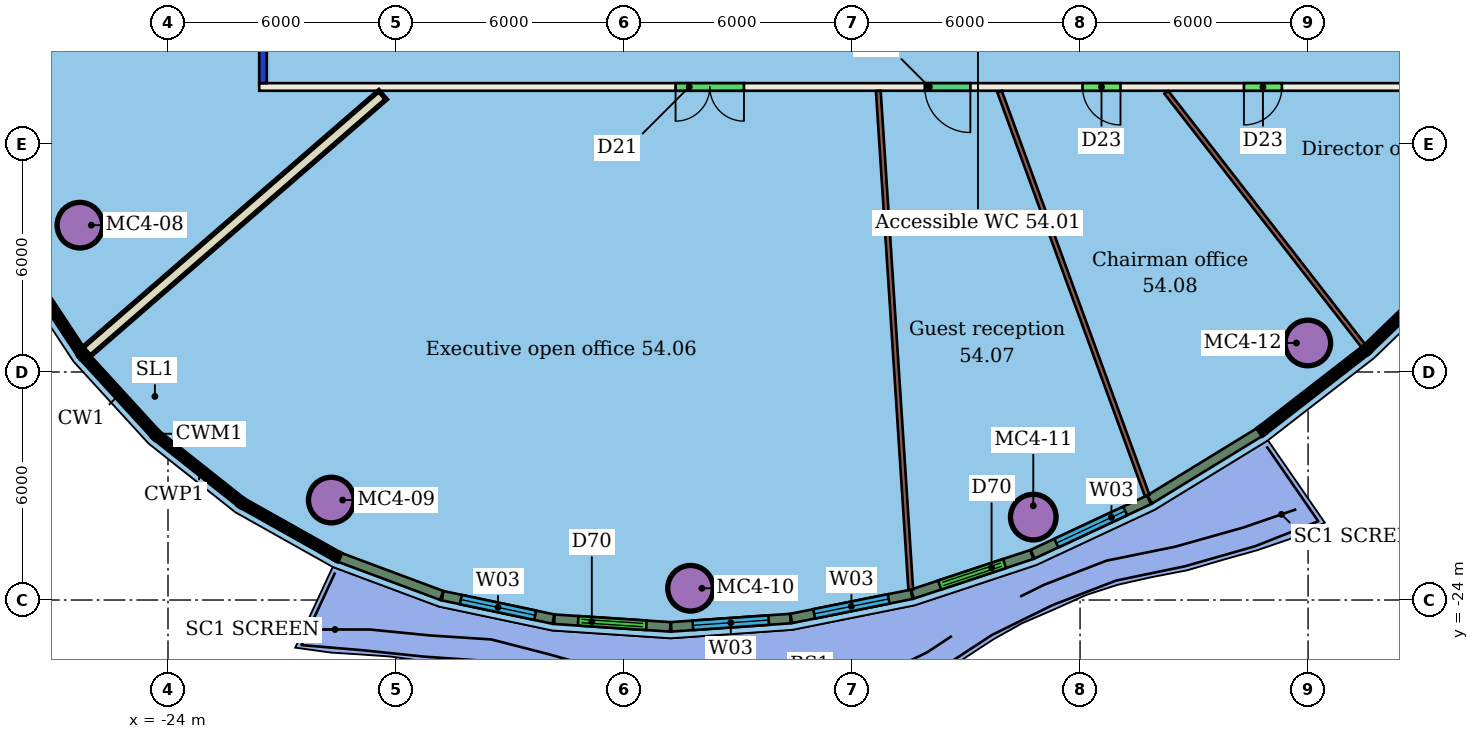
"""IFC4 building model, lengths in metres.
Left out: names, types, materials, properties, quantities, classifications, styles, units other than length and angle.
Written with IfcOpenShell. Run it as: python <this file> out.ifc"""

import sys

from ifc_helpers import new_model, si_unit, direction, frame, frame_2d, origin, origin_2d, place, context, subcontext, project, spatial, rectangle, hollow_circle, extrude, element, fill, save


model = new_model("IFC4")
c1 = context("Model", 3, precision=1e-05, world=origin(), true_north=direction((0.0, 1.0)))
c2 = subcontext(c1, "Body", "Model", "MODEL_VIEW")
j1 = project(units=[si_unit("LENGTHUNIT", "METRE"), si_unit("PLANEANGLEUNIT", "RADIAN")], contexts=[c1])
p1 = place(None, origin())
s1 = spatial("IfcSite", under=j1, at=p1, CompositionType="ELEMENT")
p2 = place(p1, origin())
s2 = spatial("IfcBuilding", under=s1, at=p2, CompositionType="ELEMENT")
p3 = place(p2, frame((0.0, 0.0, 220.9)))
s3 = spatial("IfcBuildingStorey", under=s2, at=p3, CompositionType="ELEMENT", Elevation=220.9)
for number, where, z_axis, x_axis in (
    (1, (-26.318, -14.137, 0.0), (0.0, 0.0, 1.0), (1.0, 0.0, 0.0)),
    (2, (-19.704, -21.37, 0.0), (0.0, 0.0, 1.0), (1.0, 0.0, 0.0)),
    (3, (-10.25, -23.691, 0.0), (0.0, 0.0, 1.0), (1.0, 0.0, 0.0)),
    (4, (-1.231, -21.819, 0.0), (0.0, 0.0, 1.0), (1.0, 0.0, 0.0)),
    (5, (5.993, -17.237, 0.0), (0.0, 0.0, 1.0), (1.0, 0.0, 0.0)),
):
    element("IfcColumn", number, at=place(p3, frame(where, z_axis=z_axis, x_axis=x_axis)), inside=s3, PredefinedType="COLUMN", context=c2, shape_type="SweptSolid", body=[
        extrude(hollow_circle(Radius=0.6, WallThickness=0.045, at=origin_2d()), origin(), (0.0, 0.0, 1.0), 3.45),
    ])
p4 = place(p3, frame((9.6, -10.5, 0.0), z_axis=(0.0, 0.0, 1.0), x_axis=(-1.0, 0.0, 0.0)))
e6 = element("IfcWall", 6, at=p4, inside=s3, PredefinedType="PARTITIONING", context=c2, shape_type="SweptSolid", body=[
    extrude(rectangle(XDim=31.2, YDim=0.2, at=frame_2d((15.6, 0.0))), origin(), (0.0, 0.0, 1.0), 3.45),
])
p5 = place(p4, frame((18.444, 0.0, 0.0)))
e7 = element("IfcOpeningElement", 7, at=p5, cuts=e6, PredefinedType="OPENING", context=c2, shape_type="SweptSolid", body=[
    extrude(rectangle(XDim=1.8, YDim=2.1, at=frame_2d((0.9, 1.05))), frame((0.0, 0.11, 0.0), z_axis=(0.0, -1.0, 0.0), x_axis=(1.0, 0.0, 0.0)), (0.0, 0.0, 1.0), 0.22),
])
p6 = place(p4, frame((12.487, 0.0, 0.0)))
e8 = element("IfcOpeningElement", 8, at=p6, cuts=e6, PredefinedType="OPENING", context=c2, shape_type="SweptSolid", body=[
    extrude(rectangle(XDim=1.2, YDim=2.4, at=frame_2d((0.6, 1.2))), frame((0.0, 0.11, 0.0), z_axis=(0.0, -1.0, 0.0), x_axis=(1.0, 0.0, 0.0)), (0.0, 0.0, 1.0), 0.22),
])
p7 = place(p4, frame((8.536, 0.0, 0.0)))
e9 = element("IfcOpeningElement", 9, at=p7, cuts=e6, PredefinedType="OPENING", context=c2, shape_type="SweptSolid", body=[
    extrude(rectangle(XDim=1.0, YDim=2.4, at=frame_2d((0.5, 1.2))), frame((0.0, 0.11, 0.0), z_axis=(0.0, -1.0, 0.0), x_axis=(1.0, 0.0, 0.0)), (0.0, 0.0, 1.0), 0.22),
])
p8 = place(p4, frame((4.288, 0.0, 0.0)))
e10 = element("IfcOpeningElement", 10, at=p8, cuts=e6, PredefinedType="OPENING", context=c2, shape_type="SweptSolid", body=[
    extrude(rectangle(XDim=1.0, YDim=2.4, at=frame_2d((0.5, 1.2))), frame((0.0, 0.11, 0.0), z_axis=(0.0, -1.0, 0.0), x_axis=(1.0, 0.0, 0.0)), (0.0, 0.0, 1.0), 0.22),
])
p9 = place(p3, frame((-21.5, -10.4, 0.0), z_axis=(0.0, 0.0, 1.0), x_axis=(0.0, 1.0, 0.0)))
e11 = element("IfcWall", 11, at=p9, inside=s3, PredefinedType="PARTITIONING", context=c2, shape_type="SweptSolid", body=[
    extrude(rectangle(XDim=20.8, YDim=0.2, at=frame_2d((10.4, 0.0))), origin(), (0.0, 0.0, 1.0), 3.05),
])
p10 = place(p9, frame((13.413, 0.0, 0.0)))
e12 = element("IfcOpeningElement", 12, at=p10, cuts=e11, PredefinedType="OPENING", context=c2, shape_type="SweptSolid", body=[
    extrude(rectangle(XDim=1.0, YDim=2.4, at=frame_2d((0.5, 1.2))), frame((0.0, 0.11, 0.0), z_axis=(0.0, -1.0, 0.0), x_axis=(1.0, 0.0, 0.0)), (0.0, 0.0, 1.0), 0.22),
])
p11 = place(p9, frame((5.693, 0.0, 0.0)))
e13 = element("IfcOpeningElement", 13, at=p11, cuts=e11, PredefinedType="OPENING", context=c2, shape_type="SweptSolid", body=[
    extrude(rectangle(XDim=1.8, YDim=2.4, at=frame_2d((0.9, 1.2))), frame((0.0, 0.11, 0.0), z_axis=(0.0, -1.0, 0.0), x_axis=(1.0, 0.0, 0.0)), (0.0, 0.0, 1.0), 0.22),
])
p12 = place(p3, frame((-26.146, -17.469, 0.0), z_axis=(0.0, 0.0, 1.0), x_axis=(0.755515634714, 0.655130617284, 0.0)))
e14 = element("IfcWall", 14, at=p12, inside=s3, PredefinedType="PARTITIONING", context=c2, shape_type="SweptSolid", body=[
    extrude(rectangle(XDim=10.312, YDim=0.3, at=frame_2d((5.156, 0.0))), origin(), (0.0, 0.0, 1.0), 3.45),
])
p13 = place(p3, frame((-4.455, -23.727, 0.0), z_axis=(0.0, 0.0, 1.0), x_axis=(-0.064995948595, 0.997885527837, 0.0)))
e15 = element("IfcWall", 15, at=p13, inside=s3, PredefinedType="PARTITIONING", context=c2, shape_type="SweptSolid", body=[
    extrude(rectangle(XDim=13.151, YDim=0.125, at=frame_2d((6.575, 0.0))), origin(), (0.0, 0.0, 1.0), 3.45),
])
p14 = place(p3, frame((1.765, -21.249, 0.0), z_axis=(0.0, 0.0, 1.0), x_axis=(-0.343220407619, 0.939254891813, 0.0)))
e16 = element("IfcWall", 16, at=p14, inside=s3, PredefinedType="PARTITIONING", context=c2, shape_type="SweptSolid", body=[
    extrude(rectangle(XDim=11.315, YDim=0.125, at=frame_2d((5.657, 0.0))), origin(), (0.0, 0.0, 1.0), 3.45),
])
p15 = place(p3, frame((7.457, -17.314, 0.0), z_axis=(0.0, 0.0, 1.0), x_axis=(-0.613674696521, 0.789558969837, 0.0)))
e17 = element("IfcWall", 17, at=p15, inside=s3, PredefinedType="PARTITIONING", context=c2, shape_type="SweptSolid", body=[
    extrude(rectangle(XDim=8.455, YDim=0.125, at=frame_2d((4.228, 0.0))), origin(), (0.0, 0.0, 1.0), 3.45),
])
p16 = place(p3, frame((-19.488, -22.876, 0.0), z_axis=(0.0, 0.0, 1.0), x_axis=(0.936925456517, -0.34952923902, 0.0)))
e18 = element("IfcWall", 18, at=p16, inside=s3, PredefinedType="SOLIDWALL", context=c2, shape_type="SweptSolid", body=[
    extrude(rectangle(XDim=2.871, YDim=0.25, at=frame_2d((1.436, 0.0))), origin(), (0.0, 0.0, 1.0), 3.1),
])
p17 = place(p3, frame((-16.773, -23.887, 0.0), z_axis=(0.0, 0.0, 1.0), x_axis=(0.978444408338, -0.206510386645, 0.0)))
e19 = element("IfcWall", 19, at=p17, inside=s3, PredefinedType="SOLIDWALL", context=c2, shape_type="SweptSolid", body=[
    extrude(rectangle(XDim=2.978, YDim=0.25, at=frame_2d((1.489, 0.0))), origin(), (0.0, 0.0, 1.0), 3.1),
])
p18 = place(p17, frame((0.489, 0.0, 0.9)))
e20 = element("IfcOpeningElement", 20, at=p18, cuts=e19, PredefinedType="OPENING", context=c2, shape_type="SweptSolid", body=[
    extrude(rectangle(XDim=2.0, YDim=2.1, at=frame_2d((1.0, 1.05))), frame((0.0, 0.135, 0.0), z_axis=(0.0, -1.0, 0.0), x_axis=(1.0, 0.0, 0.0)), (0.0, 0.0, 1.0), 0.27),
])
p19 = place(p3, frame((-13.833, -24.506, 0.0), z_axis=(0.0, 0.0, 1.0), x_axis=(0.997842734826, -0.065649650074, 0.0)))
e21 = element("IfcWall", 21, at=p19, inside=s3, PredefinedType="SOLIDWALL", context=c2, shape_type="SweptSolid", body=[
    extrude(rectangle(XDim=3.057, YDim=0.25, at=frame_2d((1.528, 0.0))), origin(), (0.0, 0.0, 1.0), 3.1),
])
p20 = place(p19, frame((0.628, 0.0, 0.0)))
e22 = element("IfcOpeningElement", 22, at=p20, cuts=e21, PredefinedType="OPENING", context=c2, shape_type="SweptSolid", body=[
    extrude(rectangle(XDim=1.8, YDim=2.4, at=frame_2d((0.9, 1.2))), frame((0.0, 0.135, 0.0), z_axis=(0.0, -1.0, 0.0), x_axis=(1.0, 0.0, 0.0)), (0.0, 0.0, 1.0), 0.27),
])
p21 = place(p3, frame((-10.758, -24.706, 0.0), z_axis=(0.0, 0.0, 1.0), x_axis=(0.997585250628, 0.069452629395, 0.0)))
e23 = element("IfcWall", 23, at=p21, inside=s3, PredefinedType="SOLIDWALL", context=c2, shape_type="SweptSolid", body=[
    extrude(rectangle(XDim=3.143, YDim=0.25, at=frame_2d((1.571, 0.0))), origin(), (0.0, 0.0, 1.0), 3.1),
])
p22 = place(p21, frame((0.571, 0.0, 0.9)))
e24 = element("IfcOpeningElement", 24, at=p22, cuts=e23, PredefinedType="OPENING", context=c2, shape_type="SweptSolid", body=[
    extrude(rectangle(XDim=2.0, YDim=2.1, at=frame_2d((1.0, 1.05))), frame((0.0, 0.135, 0.0), z_axis=(0.0, -1.0, 0.0), x_axis=(1.0, 0.0, 0.0)), (0.0, 0.0, 1.0), 0.27),
])
p23 = place(p3, frame((-7.6, -24.485, 0.0), z_axis=(0.0, 0.0, 1.0), x_axis=(0.980484586875, 0.19659596868, 0.0)))
e25 = element("IfcWall", 25, at=p23, inside=s3, PredefinedType="SOLIDWALL", context=c2, shape_type="SweptSolid", body=[
    extrude(rectangle(XDim=3.229, YDim=0.25, at=frame_2d((1.614, 0.0))), origin(), (0.0, 0.0, 1.0), 3.1),
])
p24 = place(p23, frame((0.614, 0.0, 0.9)))
e26 = element("IfcOpeningElement", 26, at=p24, cuts=e25, PredefinedType="OPENING", context=c2, shape_type="SweptSolid", body=[
    extrude(rectangle(XDim=2.0, YDim=2.1, at=frame_2d((1.0, 1.05))), frame((0.0, 0.135, 0.0), z_axis=(0.0, -1.0, 0.0), x_axis=(1.0, 0.0, 0.0)), (0.0, 0.0, 1.0), 0.27),
])
p25 = place(p3, frame((-4.411, -23.844, 0.0), z_axis=(0.0, 0.0, 1.0), x_axis=(0.949220414117, 0.314611832935, 0.0)))
e27 = element("IfcWall", 27, at=p25, inside=s3, PredefinedType="SOLIDWALL", context=c2, shape_type="SweptSolid", body=[
    extrude(rectangle(XDim=3.31, YDim=0.25, at=frame_2d((1.655, 0.0))), origin(), (0.0, 0.0, 1.0), 3.1),
])
p26 = place(p25, frame((0.755, 0.0, 0.0)))
e28 = element("IfcOpeningElement", 28, at=p26, cuts=e27, PredefinedType="OPENING", context=c2, shape_type="SweptSolid", body=[
    extrude(rectangle(XDim=1.8, YDim=2.4, at=frame_2d((0.9, 1.2))), frame((0.0, 0.135, 0.0), z_axis=(0.0, -1.0, 0.0), x_axis=(1.0, 0.0, 0.0)), (0.0, 0.0, 1.0), 0.27),
])
p27 = place(p3, frame((-1.249, -22.794, 0.0), z_axis=(0.0, 0.0, 1.0), x_axis=(0.906026245015, 0.42322150624, 0.0)))
e29 = element("IfcWall", 29, at=p27, inside=s3, PredefinedType="SOLIDWALL", context=c2, shape_type="SweptSolid", body=[
    extrude(rectangle(XDim=3.38, YDim=0.25, at=frame_2d((1.69, 0.0))), origin(), (0.0, 0.0, 1.0), 3.1),
])
p28 = place(p27, frame((0.69, 0.0, 0.9)))
e30 = element("IfcOpeningElement", 30, at=p28, cuts=e29, PredefinedType="OPENING", context=c2, shape_type="SweptSolid", body=[
    extrude(rectangle(XDim=2.0, YDim=2.1, at=frame_2d((1.0, 1.05))), frame((0.0, 0.135, 0.0), z_axis=(0.0, -1.0, 0.0), x_axis=(1.0, 0.0, 0.0)), (0.0, 0.0, 1.0), 0.27),
])
p29 = place(p3, frame((1.833, -21.353, 0.0), z_axis=(0.0, 0.0, 1.0), x_axis=(0.852681900505, 0.522430451402, 0.0)))
e31 = element("IfcWall", 31, at=p29, inside=s3, PredefinedType="SOLIDWALL", context=c2, shape_type="SweptSolid", body=[
    extrude(rectangle(XDim=3.393, YDim=0.25, at=frame_2d((1.697, 0.0))), origin(), (0.0, 0.0, 1.0), 3.1),
])
p30 = place(p5, origin())
e32 = element("IfcDoor", 32, at=p30, inside=s3, OperationType="DOUBLE_DOOR_SINGLE_SWING", PredefinedType="DOOR", context=c2, shape_type="SweptSolid", body=[
    extrude(rectangle(XDim=1.8, YDim=2.1, at=frame_2d((0.9, 1.05))), frame((0.0, 0.025, 0.0), z_axis=(0.0, -1.0, 0.0), x_axis=(1.0, 0.0, 0.0)), (0.0, 0.0, 1.0), 0.05),
])
fill(e7, e32)
p31 = place(p6, origin())
e33 = element("IfcDoor", 33, at=p31, inside=s3, OperationType="SINGLE_SWING_LEFT", PredefinedType="DOOR", context=c2, shape_type="SweptSolid", body=[
    extrude(rectangle(XDim=1.2, YDim=2.4, at=frame_2d((0.6, 1.2))), frame((0.0, 0.025, 0.0), z_axis=(0.0, -1.0, 0.0), x_axis=(1.0, 0.0, 0.0)), (0.0, 0.0, 1.0), 0.05),
])
fill(e8, e33)
p32 = place(p7, origin())
e34 = element("IfcDoor", 34, at=p32, inside=s3, OperationType="SINGLE_SWING_LEFT", PredefinedType="DOOR", context=c2, shape_type="SweptSolid", body=[
    extrude(rectangle(XDim=1.0, YDim=2.4, at=frame_2d((0.5, 1.2))), frame((0.0, 0.025, 0.0), z_axis=(0.0, -1.0, 0.0), x_axis=(1.0, 0.0, 0.0)), (0.0, 0.0, 1.0), 0.05),
])
fill(e9, e34)
p33 = place(p8, origin())
e35 = element("IfcDoor", 35, at=p33, inside=s3, OperationType="SINGLE_SWING_RIGHT", PredefinedType="DOOR", context=c2, shape_type="SweptSolid", body=[
    extrude(rectangle(XDim=1.0, YDim=2.4, at=frame_2d((0.5, 1.2))), frame((0.0, 0.025, 0.0), z_axis=(0.0, -1.0, 0.0), x_axis=(1.0, 0.0, 0.0)), (0.0, 0.0, 1.0), 0.05),
])
fill(e10, e35)
p34 = place(p18, origin())
e36 = element("IfcWindow", 36, at=p34, inside=s3, PartitioningType="SINGLE_PANEL", PredefinedType="WINDOW", context=c2, shape_type="SweptSolid", body=[
    extrude(rectangle(XDim=2.0, YDim=2.1, at=frame_2d((1.0, 1.05))), frame((0.0, 0.03, 0.0), z_axis=(0.0, -1.0, 0.0), x_axis=(1.0, 0.0, 0.0)), (0.0, 0.0, 1.0), 0.06),
])
fill(e20, e36)
p35 = place(p20, origin())
e37 = element("IfcDoor", 37, at=p35, inside=s3, OperationType="DOUBLE_DOOR_SLIDING", PredefinedType="DOOR", context=c2, shape_type="SweptSolid", body=[
    extrude(rectangle(XDim=1.8, YDim=2.4, at=frame_2d((0.9, 1.2))), frame((0.0, 0.025, 0.0), z_axis=(0.0, -1.0, 0.0), x_axis=(1.0, 0.0, 0.0)), (0.0, 0.0, 1.0), 0.05),
])
fill(e22, e37)
p36 = place(p22, origin())
e38 = element("IfcWindow", 38, at=p36, inside=s3, PartitioningType="SINGLE_PANEL", PredefinedType="WINDOW", context=c2, shape_type="SweptSolid", body=[
    extrude(rectangle(XDim=2.0, YDim=2.1, at=frame_2d((1.0, 1.05))), frame((0.0, 0.03, 0.0), z_axis=(0.0, -1.0, 0.0), x_axis=(1.0, 0.0, 0.0)), (0.0, 0.0, 1.0), 0.06),
])
fill(e24, e38)
p37 = place(p24, origin())
e39 = element("IfcWindow", 39, at=p37, inside=s3, PartitioningType="SINGLE_PANEL", PredefinedType="WINDOW", context=c2, shape_type="SweptSolid", body=[
    extrude(rectangle(XDim=2.0, YDim=2.1, at=frame_2d((1.0, 1.05))), frame((0.0, 0.03, 0.0), z_axis=(0.0, -1.0, 0.0), x_axis=(1.0, 0.0, 0.0)), (0.0, 0.0, 1.0), 0.06),
])
fill(e26, e39)
p38 = place(p26, origin())
e40 = element("IfcDoor", 40, at=p38, inside=s3, OperationType="DOUBLE_DOOR_SLIDING", PredefinedType="DOOR", context=c2, shape_type="SweptSolid", body=[
    extrude(rectangle(XDim=1.8, YDim=2.4, at=frame_2d((0.9, 1.2))), frame((0.0, 0.025, 0.0), z_axis=(0.0, -1.0, 0.0), x_axis=(1.0, 0.0, 0.0)), (0.0, 0.0, 1.0), 0.05),
])
fill(e28, e40)
p39 = place(p28, origin())
e41 = element("IfcWindow", 41, at=p39, inside=s3, PartitioningType="SINGLE_PANEL", PredefinedType="WINDOW", context=c2, shape_type="SweptSolid", body=[
    extrude(rectangle(XDim=2.0, YDim=2.1, at=frame_2d((1.0, 1.05))), frame((0.0, 0.03, 0.0), z_axis=(0.0, -1.0, 0.0), x_axis=(1.0, 0.0, 0.0)), (0.0, 0.0, 1.0), 0.06),
])
fill(e30, e41)
save(model, sys.argv[1])
